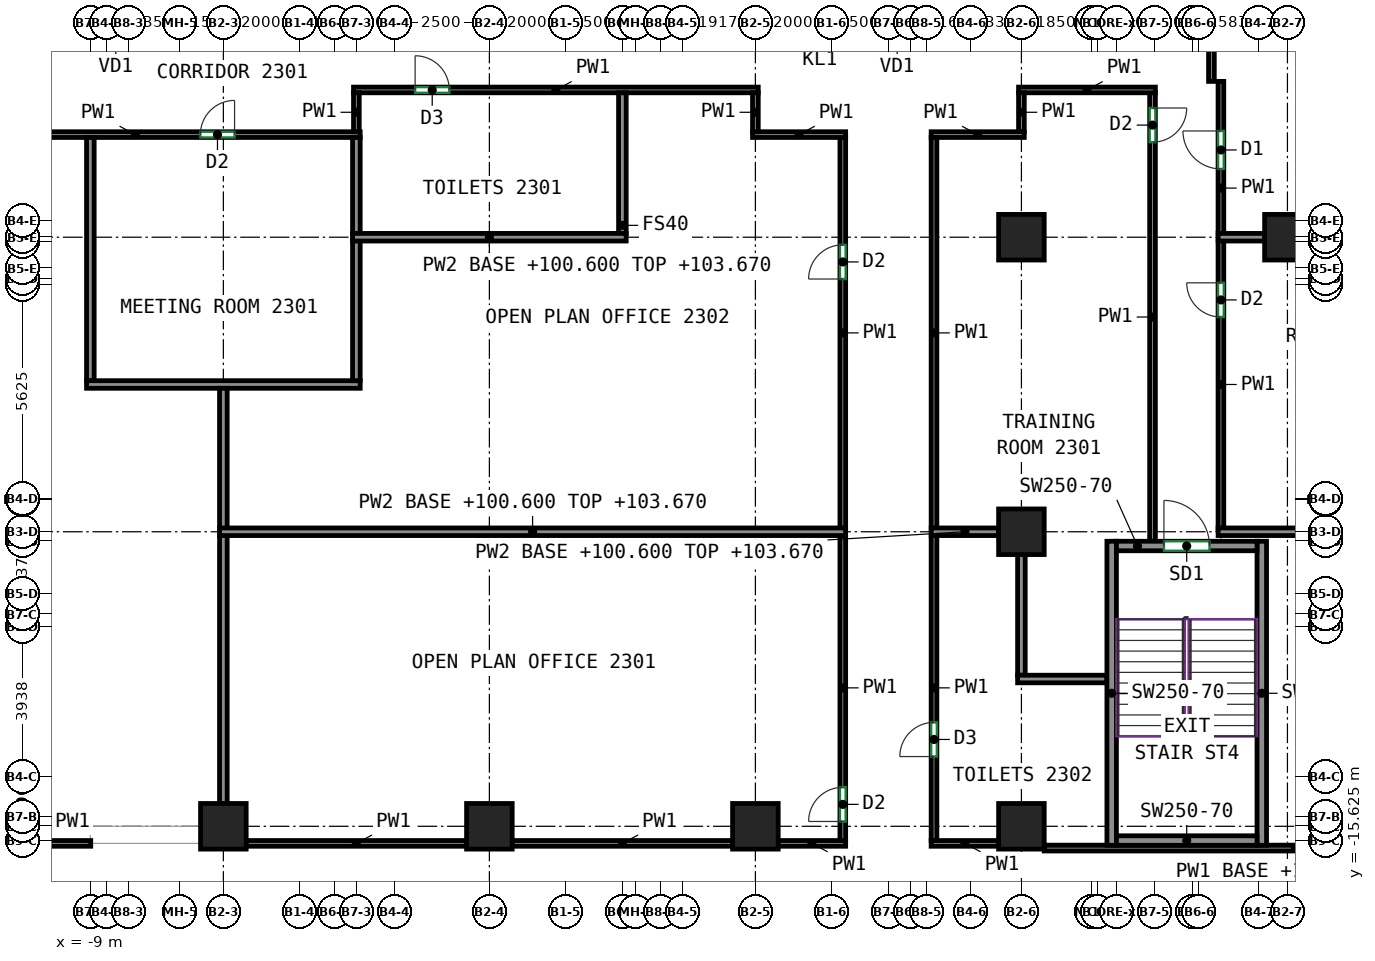
"""IFC4 building model, lengths in metres.
Left out: names, types, materials, properties, quantities, classifications, styles, units other than length and angle.
Written with IfcOpenShell. Run it as: python <this file> out.ifc"""

import sys

from ifc_helpers import new_model, si_unit, direction, frame, frame_2d, origin, origin_2d, place, context, subcontext, project, spatial, rectangle, extrude, source, transform, mapped, element, fill, save


model = new_model("IFC4")
c1 = context("Model", 3, precision=1e-05, world=origin(), true_north=direction((0.0, 1.0)))
c2 = subcontext(c1, "Body", "Model", "MODEL_VIEW")
j1 = project(units=[si_unit("LENGTHUNIT", "METRE"), si_unit("PLANEANGLEUNIT", "RADIAN")], contexts=[c1])
p1 = place(None, origin())
s1 = spatial("IfcSite", under=j1, at=p1, CompositionType="ELEMENT")
p2 = place(p1, origin())
s2 = spatial("IfcBuilding", under=s1, at=p2, CompositionType="ELEMENT")
p3 = place(p2, frame((0.0, 0.0, 100.6)))
s3 = spatial("IfcBuildingStorey", under=s2, at=p3, CompositionType="ELEMENT", Elevation=100.6)
m1 = source(origin(), c2, "Body", "SweptSolid", [
    extrude(rectangle(XDim=1.2, YDim=1.2, at=origin_2d()), origin(), (0.0, 0.0, 1.0), 3.72),
])
for number, where, z_axis, x_axis in (
    (1, (-5.5, -15.25, 0.0), (0.0, 0.0, 1.0), (1.0, 0.0, 0.0)),
    (2, (1.5, -15.25, 0.0), (0.0, 0.0, 1.0), (1.0, 0.0, 0.0)),
    (3, (8.5, -15.25, 0.0), (0.0, 0.0, 1.0), (1.0, 0.0, 0.0)),
    (4, (15.5, -15.25, 0.0), (0.0, 0.0, 1.0), (1.0, 0.0, 0.0)),
    (5, (15.5, -7.5, 0.0), (0.0, 0.0, 1.0), (1.0, 0.0, 0.0)),
    (6, (15.5, 0.25, 0.0), (0.0, 0.0, 1.0), (1.0, 0.0, 0.0)),
    (7, (22.5, 0.25, 0.0), (0.0, 0.0, 1.0), (1.0, 0.0, 0.0)),
):
    element("IfcColumn", number, at=place(p3, frame(where, z_axis=z_axis, x_axis=x_axis)), inside=s3, PredefinedType="COLUMN", context=c2, shape_type="MappedRepresentation", body=[
        mapped(m1, transform((0.0, 0.0, 0.0))),
    ])
m2 = source(origin(), c2, "Body", "SweptSolid", [
    extrude(rectangle(XDim=8.0, YDim=0.25, at=frame_2d((4.0, 0.0))), origin(), (0.0, 0.0, 1.0), 3.72),
])
for number, where, z_axis, x_axis in (
    (8, (17.875, -15.75, 0.0), (0.0, 0.0, 1.0), (0.0, 1.0, 0.0)),
    (9, (21.825, -15.75, 0.0), (0.0, 0.0, 1.0), (0.0, 1.0, 0.0)),
):
    element("IfcWall", number, at=place(p3, frame(where, z_axis=z_axis, x_axis=x_axis)), inside=s3, PredefinedType="SHEAR", context=c2, shape_type="MappedRepresentation", body=[
        mapped(m2, transform((0.0, 0.0, 0.0))),
    ])
m3 = source(origin(), c2, "Body", "SweptSolid", [
    extrude(rectangle(XDim=3.7, YDim=0.25, at=frame_2d((1.85, 0.0))), origin(), (0.0, 0.0, 1.0), 3.72),
])
p4 = place(p3, frame((18.0, -15.625, 0.0), z_axis=(0.0, 0.0, 1.0), x_axis=(1.0, 0.0, 0.0)))
e10 = element("IfcWall", 10, at=p4, inside=s3, PredefinedType="SHEAR", context=c2, shape_type="MappedRepresentation", body=[
    mapped(m3, transform((0.0, 0.0, 0.0))),
])
p5 = place(p3, frame((18.0, -7.875, 0.0), z_axis=(0.0, 0.0, 1.0), x_axis=(1.0, 0.0, 0.0)))
e11 = element("IfcWall", 11, at=p5, inside=s3, PredefinedType="SHEAR", context=c2, shape_type="MappedRepresentation", body=[
    mapped(m3, transform((0.0, 0.0, 0.0))),
])
p6 = place(p5, frame((1.25, 0.0, 0.0)))
e12 = element("IfcOpeningElement", 12, at=p6, cuts=e11, PredefinedType="OPENING", context=c2, shape_type="SweptSolid", body=[
    extrude(rectangle(XDim=1.2, YDim=2.1, at=frame_2d((0.6, 1.05))), frame((0.0, 0.135, 0.0), z_axis=(0.0, -1.0, 0.0), x_axis=(1.0, 0.0, 0.0)), (0.0, 0.0, 1.0), 0.27),
])
p7 = place(p3, frame((-11.9, -15.7, 0.0), z_axis=(0.0, 0.0, 1.0), x_axis=(1.0, 0.0, 0.0)))
e13 = element("IfcWall", 13, at=p7, inside=s3, PredefinedType="PARTITIONING", context=c2, shape_type="SweptSolid", body=[
    extrude(rectangle(XDim=2.91, YDim=0.15, at=frame_2d((1.455, 0.0))), origin(), (0.0, 0.0, 1.0), 3.72),
])
p8 = place(p3, frame((-13.735, 2.95, 0.0), z_axis=(0.0, 0.0, 1.0), x_axis=(1.0, 0.0, 0.0)))
e14 = element("IfcWall", 14, at=p8, inside=s3, PredefinedType="PARTITIONING", context=c2, shape_type="SweptSolid", body=[
    extrude(rectangle(XDim=11.835, YDim=0.15, at=frame_2d((5.917, 0.0))), origin(), (0.0, 0.0, 1.0), 3.72),
])
p9 = place(p8, frame((7.63, 0.0, 0.0)))
e15 = element("IfcOpeningElement", 15, at=p9, cuts=e14, PredefinedType="OPENING", context=c2, shape_type="SweptSolid", body=[
    extrude(rectangle(XDim=0.9, YDim=2.1, at=frame_2d((0.45, 1.05))), frame((0.0, 0.085, 0.0), z_axis=(0.0, -1.0, 0.0), x_axis=(1.0, 0.0, 0.0)), (0.0, 0.0, 1.0), 0.17),
])
p10 = place(p3, frame((-2.075, 4.125, 0.0), z_axis=(0.0, 0.0, 1.0), x_axis=(1.0, 0.0, 0.0)))
e16 = element("IfcWall", 16, at=p10, inside=s3, PredefinedType="PARTITIONING", context=c2, shape_type="SweptSolid", body=[
    extrude(rectangle(XDim=10.65, YDim=0.15, at=frame_2d((5.325, 0.0))), origin(), (0.0, 0.0, 1.0), 3.72),
])
p11 = place(p10, frame((1.621, 0.0, 0.0)))
e17 = element("IfcOpeningElement", 17, at=p11, cuts=e16, PredefinedType="OPENING", context=c2, shape_type="SweptSolid", body=[
    extrude(rectangle(XDim=0.9, YDim=2.1, at=frame_2d((0.45, 1.05))), frame((0.0, 0.085, 0.0), z_axis=(0.0, -1.0, 0.0), x_axis=(1.0, 0.0, 0.0)), (0.0, 0.0, 1.0), 0.17),
])
p12 = place(p3, frame((-2.0, 3.025, 0.0), z_axis=(0.0, 0.0, 1.0), x_axis=(0.0, 1.0, 0.0)))
e18 = element("IfcWall", 18, at=p12, inside=s3, PredefinedType="PARTITIONING", context=c2, shape_type="SweptSolid", body=[
    extrude(rectangle(XDim=1.025, YDim=0.15, at=frame_2d((0.513, 0.0))), origin(), (0.0, 0.0, 1.0), 3.72),
])
for number, where, z_axis, x_axis in (
    (19, (-4.9, -15.7, 0.0), (0.0, 0.0, 1.0), (1.0, 0.0, 0.0)),
    (20, (2.1, -15.7, 0.0), (0.0, 0.0, 1.0), (1.0, 0.0, 0.0)),
):
    element("IfcWall", number, at=place(p3, frame(where, z_axis=z_axis, x_axis=x_axis)), inside=s3, PredefinedType="PARTITIONING", context=c2, shape_type="SweptSolid", body=[
        extrude(rectangle(XDim=5.8, YDim=0.15, at=frame_2d((2.9, 0.0))), origin(), (0.0, 0.0, 1.0), 3.72),
    ])
p13 = place(p3, frame((9.1, -15.7, 0.0), z_axis=(0.0, 0.0, 1.0), x_axis=(1.0, 0.0, 0.0)))
e21 = element("IfcWall", 21, at=p13, inside=s3, PredefinedType="PARTITIONING", context=c2, shape_type="SweptSolid", body=[
    extrude(rectangle(XDim=1.775, YDim=0.15, at=frame_2d((0.887, 0.0))), origin(), (0.0, 0.0, 1.0), 3.72),
])
p14 = place(p3, frame((10.8, -15.625, 0.0), z_axis=(0.0, 0.0, 1.0), x_axis=(0.0, 1.0, 0.0)))
e22 = element("IfcWall", 22, at=p14, inside=s3, PredefinedType="PARTITIONING", context=c2, shape_type="SweptSolid", body=[
    extrude(rectangle(XDim=8.035, YDim=0.15, at=frame_2d((4.018, 0.0))), origin(), (0.0, 0.0, 1.0), 3.72),
])
p15 = place(p14, frame((0.502, 0.0, 0.0)))
e23 = element("IfcOpeningElement", 23, at=p15, cuts=e22, PredefinedType="OPENING", context=c2, shape_type="SweptSolid", body=[
    extrude(rectangle(XDim=0.9, YDim=2.1, at=frame_2d((0.45, 1.05))), frame((0.0, 0.085, 0.0), z_axis=(0.0, -1.0, 0.0), x_axis=(1.0, 0.0, 0.0)), (0.0, 0.0, 1.0), 0.17),
])
p16 = place(p3, frame((10.8, -7.41, 0.0), z_axis=(0.0, 0.0, 1.0), x_axis=(0.0, 1.0, 0.0)))
e24 = element("IfcWall", 24, at=p16, inside=s3, PredefinedType="PARTITIONING", context=c2, shape_type="SweptSolid", body=[
    extrude(rectangle(XDim=10.285, YDim=0.15, at=frame_2d((5.143, 0.0))), origin(), (0.0, 0.0, 1.0), 3.72),
])
p17 = place(p16, frame((6.56, 0.0, 0.0)))
e25 = element("IfcOpeningElement", 25, at=p17, cuts=e24, PredefinedType="OPENING", context=c2, shape_type="SweptSolid", body=[
    extrude(rectangle(XDim=0.9, YDim=2.1, at=frame_2d((0.45, 1.05))), frame((0.0, 0.085, 0.0), z_axis=(0.0, -1.0, 0.0), x_axis=(1.0, 0.0, 0.0)), (0.0, 0.0, 1.0), 0.17),
])
p18 = place(p3, frame((8.425, 2.95, 0.0), z_axis=(0.0, 0.0, 1.0), x_axis=(1.0, 0.0, 0.0)))
e26 = element("IfcWall", 26, at=p18, inside=s3, PredefinedType="PARTITIONING", context=c2, shape_type="SweptSolid", body=[
    extrude(rectangle(XDim=2.45, YDim=0.15, at=frame_2d((1.225, 0.0))), origin(), (0.0, 0.0, 1.0), 3.72),
])
p19 = place(p3, frame((8.5, 4.05, 0.0), z_axis=(0.0, 0.0, 1.0), x_axis=(0.0, -1.0, 0.0)))
e27 = element("IfcWall", 27, at=p19, inside=s3, PredefinedType="PARTITIONING", context=c2, shape_type="SweptSolid", body=[
    extrude(rectangle(XDim=1.025, YDim=0.15, at=frame_2d((0.513, 0.0))), origin(), (0.0, 0.0, 1.0), 3.72),
])
p20 = place(p3, frame((13.125, -15.7, 0.0), z_axis=(0.0, 0.0, 1.0), x_axis=(1.0, 0.0, 0.0)))
e28 = element("IfcWall", 28, at=p20, inside=s3, PredefinedType="PARTITIONING", context=c2, shape_type="SweptSolid", body=[
    extrude(rectangle(XDim=1.775, YDim=0.15, at=frame_2d((0.887, 0.0))), origin(), (0.0, 0.0, 1.0), 3.72),
])
p21 = place(p3, frame((16.1, -15.825, 0.0), z_axis=(0.0, 0.0, 1.0), x_axis=(1.0, 0.0, 0.0)))
e29 = element("IfcWall", 29, at=p21, inside=s3, PredefinedType="PARTITIONING", context=c2, shape_type="SweptSolid", body=[
    extrude(rectangle(XDim=13.225, YDim=0.15, at=frame_2d((6.612, 0.0))), origin(), (0.0, 0.0, 1.0), 3.72),
])
p22 = place(p3, frame((13.2, -15.625, 0.0), z_axis=(0.0, 0.0, 1.0), x_axis=(0.0, 1.0, 0.0)))
e30 = element("IfcWall", 30, at=p22, inside=s3, PredefinedType="PARTITIONING", context=c2, shape_type="SweptSolid", body=[
    extrude(rectangle(XDim=8.035, YDim=0.15, at=frame_2d((4.018, 0.0))), origin(), (0.0, 0.0, 1.0), 3.72),
])
p23 = place(p22, frame((2.21, 0.0, 0.0)))
e31 = element("IfcOpeningElement", 31, at=p23, cuts=e30, PredefinedType="OPENING", context=c2, shape_type="SweptSolid", body=[
    extrude(rectangle(XDim=0.9, YDim=2.1, at=frame_2d((0.45, 1.05))), frame((0.0, 0.085, 0.0), z_axis=(0.0, -1.0, 0.0), x_axis=(1.0, 0.0, 0.0)), (0.0, 0.0, 1.0), 0.17),
])
p24 = place(p3, frame((18.95, 4.05, 0.0), z_axis=(0.0, 0.0, 1.0), x_axis=(0.0, -1.0, 0.0)))
e32 = element("IfcWall", 32, at=p24, inside=s3, PredefinedType="PARTITIONING", context=c2, shape_type="SweptSolid", body=[
    extrude(rectangle(XDim=11.8, YDim=0.15, at=frame_2d((5.9, 0.0))), origin(), (0.0, 0.0, 1.0), 3.72),
])
p25 = place(p24, frame((0.4, 0.0, 0.0)))
e33 = element("IfcOpeningElement", 33, at=p25, cuts=e32, PredefinedType="OPENING", context=c2, shape_type="SweptSolid", body=[
    extrude(rectangle(XDim=0.9, YDim=2.1, at=frame_2d((0.45, 1.05))), frame((0.0, 0.085, 0.0), z_axis=(0.0, -1.0, 0.0), x_axis=(1.0, 0.0, 0.0)), (0.0, 0.0, 1.0), 0.17),
])
p26 = place(p3, frame((15.425, 4.125, 0.0), z_axis=(0.0, 0.0, 1.0), x_axis=(1.0, 0.0, 0.0)))
e34 = element("IfcWall", 34, at=p26, inside=s3, PredefinedType="PARTITIONING", context=c2, shape_type="SweptSolid", body=[
    extrude(rectangle(XDim=3.6, YDim=0.15, at=frame_2d((1.8, 0.0))), origin(), (0.0, 0.0, 1.0), 3.72),
])
p27 = place(p3, frame((15.5, 3.025, 0.0), z_axis=(0.0, 0.0, 1.0), x_axis=(0.0, 1.0, 0.0)))
e35 = element("IfcWall", 35, at=p27, inside=s3, PredefinedType="PARTITIONING", context=c2, shape_type="SweptSolid", body=[
    extrude(rectangle(XDim=1.025, YDim=0.15, at=frame_2d((0.513, 0.0))), origin(), (0.0, 0.0, 1.0), 3.72),
])
p28 = place(p3, frame((13.125, 2.95, 0.0), z_axis=(0.0, 0.0, 1.0), x_axis=(1.0, 0.0, 0.0)))
e36 = element("IfcWall", 36, at=p28, inside=s3, PredefinedType="PARTITIONING", context=c2, shape_type="SweptSolid", body=[
    extrude(rectangle(XDim=2.45, YDim=0.15, at=frame_2d((1.225, 0.0))), origin(), (0.0, 0.0, 1.0), 3.72),
])
p29 = place(p3, frame((13.2, -7.41, 0.0), z_axis=(0.0, 0.0, 1.0), x_axis=(0.0, 1.0, 0.0)))
e37 = element("IfcWall", 37, at=p29, inside=s3, PredefinedType="PARTITIONING", context=c2, shape_type="SweptSolid", body=[
    extrude(rectangle(XDim=10.285, YDim=0.15, at=frame_2d((5.143, 0.0))), origin(), (0.0, 0.0, 1.0), 3.72),
])
p30 = place(p3, frame((20.75, -7.41, 0.0), z_axis=(0.0, 0.0, 1.0), x_axis=(0.0, 1.0, 0.0)))
e38 = element("IfcWall", 38, at=p30, inside=s3, PredefinedType="PARTITIONING", context=c2, shape_type="SweptSolid", body=[
    extrude(rectangle(XDim=7.57, YDim=0.15, at=frame_2d((3.785, 0.0))), origin(), (0.0, 0.0, 1.0), 3.72),
])
p31 = place(p30, frame((5.56, 0.0, 0.0)))
e39 = element("IfcOpeningElement", 39, at=p31, cuts=e38, PredefinedType="OPENING", context=c2, shape_type="SweptSolid", body=[
    extrude(rectangle(XDim=0.9, YDim=2.1, at=frame_2d((0.45, 1.05))), frame((0.0, 0.085, 0.0), z_axis=(0.0, -1.0, 0.0), x_axis=(1.0, 0.0, 0.0)), (0.0, 0.0, 1.0), 0.17),
])
p32 = place(p3, frame((20.5, 4.35, 0.0), z_axis=(0.0, 0.0, 1.0), x_axis=(0.0, 1.0, 0.0)))
e40 = element("IfcWall", 40, at=p32, inside=s3, PredefinedType="PARTITIONING", context=c2, shape_type="SweptSolid", body=[
    extrude(rectangle(XDim=3.56, YDim=0.15, at=frame_2d((1.78, 0.0))), origin(), (0.0, 0.0, 1.0), 3.72),
])
p33 = place(p3, frame((20.75, 0.34, 0.0), z_axis=(0.0, 0.0, 1.0), x_axis=(0.0, 1.0, 0.0)))
e41 = element("IfcWall", 41, at=p33, inside=s3, PredefinedType="PARTITIONING", context=c2, shape_type="SweptSolid", body=[
    extrude(rectangle(XDim=4.01, YDim=0.15, at=frame_2d((2.005, 0.0))), origin(), (0.0, 0.0, 1.0), 3.72),
])
p34 = place(p33, frame((1.706, 0.0, 0.0)))
e42 = element("IfcOpeningElement", 42, at=p34, cuts=e41, PredefinedType="OPENING", context=c2, shape_type="SweptSolid", body=[
    extrude(rectangle(XDim=1.0, YDim=2.1, at=frame_2d((0.5, 1.05))), frame((0.0, 0.085, 0.0), z_axis=(0.0, -1.0, 0.0), x_axis=(1.0, 0.0, 0.0)), (0.0, 0.0, 1.0), 0.17),
])
p35 = place(p3, frame((-9.0, -3.525, 0.0), z_axis=(0.0, 0.0, 1.0), x_axis=(0.0, 1.0, 0.0)))
e43 = element("IfcWall", 43, at=p35, inside=s3, PredefinedType="PARTITIONING", context=c2, shape_type="SweptSolid", body=[
    extrude(rectangle(XDim=6.399, YDim=0.2, at=frame_2d((3.199, 0.0))), origin(), (0.0, 0.0, 1.0), 3.72),
])
p36 = place(p3, frame((-9.1, -3.625, 0.0), z_axis=(0.0, 0.0, 1.0), x_axis=(1.0, 0.0, 0.0)))
e44 = element("IfcWall", 44, at=p36, inside=s3, PredefinedType="PARTITIONING", context=c2, shape_type="SweptSolid", body=[
    extrude(rectangle(XDim=7.2, YDim=0.2, at=frame_2d((3.6, 0.0))), origin(), (0.0, 0.0, 1.0), 3.72),
])
p37 = place(p3, frame((-5.5, -14.65, 0.0), z_axis=(0.0, 0.0, 1.0), x_axis=(0.0, 1.0, 0.0)))
e45 = element("IfcWall", 45, at=p37, inside=s3, PredefinedType="PARTITIONING", context=c2, shape_type="SweptSolid", body=[
    extrude(rectangle(XDim=7.06, YDim=0.2, at=frame_2d((3.53, 0.0))), origin(), (0.0, 0.0, 1.0), 3.72),
])
p38 = place(p3, frame((-5.5, -7.41, 0.0), z_axis=(0.0, 0.0, 1.0), x_axis=(0.0, 1.0, 0.0)))
e46 = element("IfcWall", 46, at=p38, inside=s3, PredefinedType="PARTITIONING", context=c2, shape_type="SweptSolid", body=[
    extrude(rectangle(XDim=3.685, YDim=0.2, at=frame_2d((1.842, 0.0))), origin(), (0.0, 0.0, 1.0), 3.72),
])
p39 = place(p3, frame((-2.0, 0.34, 0.0), z_axis=(0.0, 0.0, 1.0), x_axis=(0.0, 1.0, 0.0)))
e47 = element("IfcWall", 47, at=p39, inside=s3, PredefinedType="PARTITIONING", context=c2, shape_type="SweptSolid", body=[
    extrude(rectangle(XDim=2.534, YDim=0.2, at=frame_2d((1.267, 0.0))), origin(), (0.0, 0.0, 1.0), 3.72),
])
p40 = place(p3, frame((-2.0, -3.525, 0.0), z_axis=(0.0, 0.0, 1.0), x_axis=(0.0, 1.0, 0.0)))
e48 = element("IfcWall", 48, at=p40, inside=s3, PredefinedType="PARTITIONING", context=c2, shape_type="SweptSolid", body=[
    extrude(rectangle(XDim=3.685, YDim=0.2, at=frame_2d((1.842, 0.0))), origin(), (0.0, 0.0, 1.0), 3.72),
])
p41 = place(p3, frame((5.0, 0.35, 0.0), z_axis=(0.0, 0.0, 1.0), x_axis=(0.0, 1.0, 0.0)))
e49 = element("IfcWall", 49, at=p41, inside=s3, PredefinedType="PARTITIONING", context=c2, shape_type="SweptSolid", body=[
    extrude(rectangle(XDim=3.699, YDim=0.2, at=frame_2d((1.85, 0.0))), origin(), (0.0, 0.0, 1.0), 3.72),
])
p42 = place(p3, frame((-2.1, 0.25, 0.0), z_axis=(0.0, 0.0, 1.0), x_axis=(1.0, 0.0, 0.0)))
e50 = element("IfcWall", 50, at=p42, inside=s3, PredefinedType="PARTITIONING", context=c2, shape_type="SweptSolid", body=[
    extrude(rectangle(XDim=7.2, YDim=0.2, at=frame_2d((3.6, 0.0))), origin(), (0.0, 0.0, 1.0), 3.07),
])
p43 = place(p3, frame((-5.6, -7.5, 0.0), z_axis=(0.0, 0.0, 1.0), x_axis=(1.0, 0.0, 0.0)))
e51 = element("IfcWall", 51, at=p43, inside=s3, PredefinedType="PARTITIONING", context=c2, shape_type="SweptSolid", body=[
    extrude(rectangle(XDim=16.474, YDim=0.2, at=frame_2d((8.237, 0.0))), origin(), (0.0, 0.0, 1.0), 3.07),
])
p44 = place(p3, frame((13.126, -7.5, 0.0), z_axis=(0.0, 0.0, 1.0), x_axis=(1.0, 0.0, 0.0)))
e52 = element("IfcWall", 52, at=p44, inside=s3, PredefinedType="PARTITIONING", context=c2, shape_type="SweptSolid", body=[
    extrude(rectangle(XDim=1.774, YDim=0.2, at=frame_2d((0.887, 0.0))), origin(), (0.0, 0.0, 1.0), 3.07),
])
p45 = place(p3, frame((15.5, -11.275, 0.0), z_axis=(0.0, 0.0, 1.0), x_axis=(0.0, 1.0, 0.0)))
e53 = element("IfcWall", 53, at=p45, inside=s3, PredefinedType="PARTITIONING", context=c2, shape_type="SweptSolid", body=[
    extrude(rectangle(XDim=3.175, YDim=0.2, at=frame_2d((1.587, 0.0))), origin(), (0.0, 0.0, 1.0), 3.72),
])
p46 = place(p3, frame((17.75, -11.375, 0.0), z_axis=(0.0, 0.0, 1.0), x_axis=(-1.0, 0.0, 0.0)))
e54 = element("IfcWall", 54, at=p46, inside=s3, PredefinedType="PARTITIONING", context=c2, shape_type="SweptSolid", body=[
    extrude(rectangle(XDim=2.35, YDim=0.2, at=frame_2d((1.175, 0.0))), origin(), (0.0, 0.0, 1.0), 3.72),
])
p47 = place(p3, frame((20.676, -7.5, 0.0), z_axis=(0.0, 0.0, 1.0), x_axis=(1.0, 0.0, 0.0)))
e55 = element("IfcWall", 55, at=p47, inside=s3, PredefinedType="PARTITIONING", context=c2, shape_type="SweptSolid", body=[
    extrude(rectangle(XDim=11.449, YDim=0.2, at=frame_2d((5.725, 0.0))), origin(), (0.0, 0.0, 1.0), 3.72),
])
p48 = place(p3, frame((20.676, 0.25, 0.0), z_axis=(0.0, 0.0, 1.0), x_axis=(1.0, 0.0, 0.0)))
e56 = element("IfcWall", 56, at=p48, inside=s3, PredefinedType="PARTITIONING", context=c2, shape_type="SweptSolid", body=[
    extrude(rectangle(XDim=1.224, YDim=0.2, at=frame_2d((0.612, 0.0))), origin(), (0.0, 0.0, 1.0), 3.72),
])
p49 = place(p6, origin())
e57 = element("IfcDoor", 57, at=p49, inside=s3, OperationType="DOUBLE_DOOR_SINGLE_SWING", PredefinedType="DOOR", context=c2, shape_type="SweptSolid", body=[
    extrude(rectangle(XDim=1.2, YDim=2.1, at=frame_2d((0.6, 1.05))), frame((0.0, 0.025, 0.0), z_axis=(0.0, -1.0, 0.0), x_axis=(1.0, 0.0, 0.0)), (0.0, 0.0, 1.0), 0.05),
])
fill(e12, e57)
p50 = place(p15, origin())
e58 = element("IfcDoor", 58, at=p50, inside=s3, OperationType="SINGLE_SWING_LEFT", PredefinedType="DOOR", context=c2, shape_type="SweptSolid", body=[
    extrude(rectangle(XDim=0.9, YDim=2.1, at=frame_2d((0.45, 1.05))), frame((0.0, 0.025, 0.0), z_axis=(0.0, -1.0, 0.0), x_axis=(1.0, 0.0, 0.0)), (0.0, 0.0, 1.0), 0.05),
])
fill(e23, e58)
p51 = place(p23, origin())
e59 = element("IfcDoor", 59, at=p51, inside=s3, OperationType="SINGLE_SWING_LEFT", PredefinedType="DOOR", context=c2, shape_type="SweptSolid", body=[
    extrude(rectangle(XDim=0.9, YDim=2.1, at=frame_2d((0.45, 1.05))), frame((0.0, 0.025, 0.0), z_axis=(0.0, -1.0, 0.0), x_axis=(1.0, 0.0, 0.0)), (0.0, 0.0, 1.0), 0.05),
])
fill(e31, e59)
p52 = place(p31, origin())
e60 = element("IfcDoor", 60, at=p52, inside=s3, OperationType="SINGLE_SWING_RIGHT", PredefinedType="DOOR", context=c2, shape_type="SweptSolid", body=[
    extrude(rectangle(XDim=0.9, YDim=2.1, at=frame_2d((0.45, 1.05))), frame((0.0, 0.025, 0.0), z_axis=(0.0, -1.0, 0.0), x_axis=(1.0, 0.0, 0.0)), (0.0, 0.0, 1.0), 0.05),
])
fill(e39, e60)
p53 = place(p17, origin())
e61 = element("IfcDoor", 61, at=p53, inside=s3, OperationType="SINGLE_SWING_LEFT", PredefinedType="DOOR", context=c2, shape_type="SweptSolid", body=[
    extrude(rectangle(XDim=0.9, YDim=2.1, at=frame_2d((0.45, 1.05))), frame((0.0, 0.025, 0.0), z_axis=(0.0, -1.0, 0.0), x_axis=(1.0, 0.0, 0.0)), (0.0, 0.0, 1.0), 0.05),
])
fill(e25, e61)
p54 = place(p34, origin())
e62 = element("IfcDoor", 62, at=p54, inside=s3, OperationType="SINGLE_SWING_RIGHT", PredefinedType="DOOR", context=c2, shape_type="SweptSolid", body=[
    extrude(rectangle(XDim=1.0, YDim=2.1, at=frame_2d((0.5, 1.05))), frame((0.0, 0.025, 0.0), z_axis=(0.0, -1.0, 0.0), x_axis=(1.0, 0.0, 0.0)), (0.0, 0.0, 1.0), 0.05),
])
fill(e42, e62)
p55 = place(p9, origin())
e63 = element("IfcDoor", 63, at=p55, inside=s3, OperationType="SINGLE_SWING_RIGHT", PredefinedType="DOOR", context=c2, shape_type="SweptSolid", body=[
    extrude(rectangle(XDim=0.9, YDim=2.1, at=frame_2d((0.45, 1.05))), frame((0.0, 0.025, 0.0), z_axis=(0.0, -1.0, 0.0), x_axis=(1.0, 0.0, 0.0)), (0.0, 0.0, 1.0), 0.05),
])
fill(e15, e63)
p56 = place(p25, origin())
e64 = element("IfcDoor", 64, at=p56, inside=s3, OperationType="SINGLE_SWING_LEFT", PredefinedType="DOOR", context=c2, shape_type="SweptSolid", body=[
    extrude(rectangle(XDim=0.9, YDim=2.1, at=frame_2d((0.45, 1.05))), frame((0.0, 0.025, 0.0), z_axis=(0.0, -1.0, 0.0), x_axis=(1.0, 0.0, 0.0)), (0.0, 0.0, 1.0), 0.05),
])
fill(e33, e64)
p57 = place(p11, origin())
e65 = element("IfcDoor", 65, at=p57, inside=s3, OperationType="SINGLE_SWING_LEFT", PredefinedType="DOOR", context=c2, shape_type="SweptSolid", body=[
    extrude(rectangle(XDim=0.9, YDim=2.1, at=frame_2d((0.45, 1.05))), frame((0.0, 0.025, 0.0), z_axis=(0.0, -1.0, 0.0), x_axis=(1.0, 0.0, 0.0)), (0.0, 0.0, 1.0), 0.05),
])
fill(e17, e65)
save(model, sys.argv[1])
